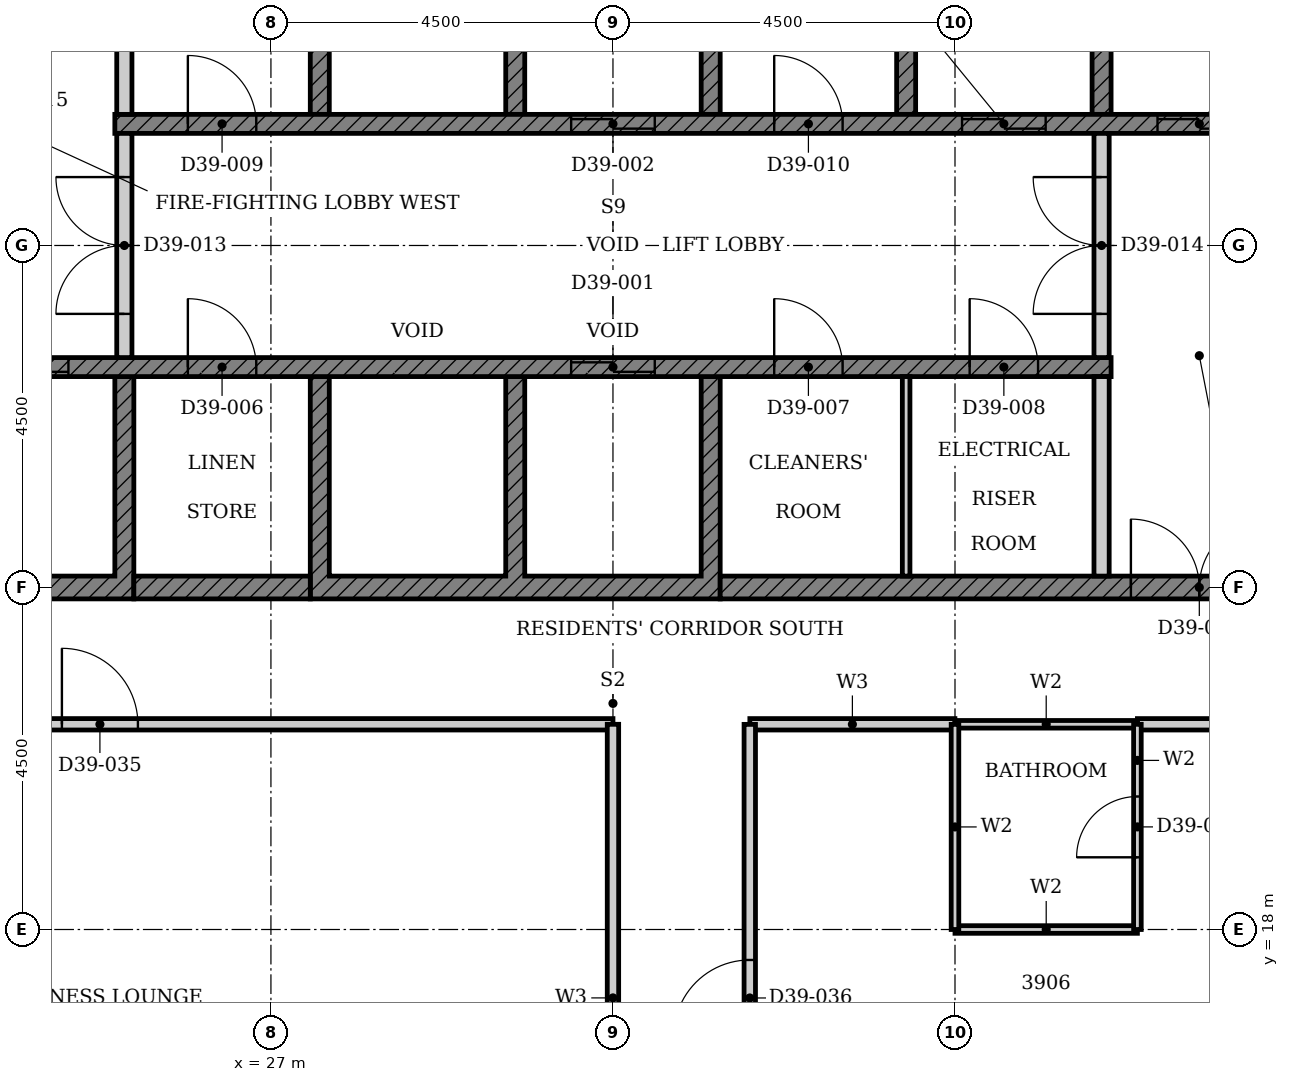
"""IFC4 building model, lengths in metres.
Left out: names, types, materials, properties, quantities, classifications, styles, units other than length and angle.
Written with IfcOpenShell. Run it as: python <this file> out.ifc"""

import sys

from ifc_helpers import new_model, si_unit, direction, frame, frame_2d, origin, place, context, subcontext, project, spatial, polyline, rectangle, outline, extrude, element, fill, save


model = new_model("IFC4")
c1 = context("Model", 3, precision=1e-05, world=origin(), true_north=direction((0.0, 1.0)))
c2 = subcontext(c1, "Body", "Model", "MODEL_VIEW")
j1 = project(units=[si_unit("LENGTHUNIT", "METRE"), si_unit("PLANEANGLEUNIT", "RADIAN")], contexts=[c1])
p1 = place(None, origin())
s1 = spatial("IfcSite", under=j1, at=p1, CompositionType="ELEMENT")
p2 = place(p1, origin())
s2 = spatial("IfcBuilding", under=s1, at=p2, CompositionType="ELEMENT")
p3 = place(p2, frame((0.0, 0.0, 158.0)))
s3 = spatial("IfcBuildingStorey", under=s2, at=p3, CompositionType="ELEMENT", Elevation=158.0)
p4 = place(p3, origin())
e1 = element("IfcWall", 1, at=p4, inside=s3, PredefinedType="SHEAR", context=c2, shape_type="SweptSolid", body=[
    extrude(outline(polyline([(22.375, 22.35), (25.197, 22.35), (25.197, 25.275), (24.947, 25.275), (24.947, 22.65), (22.625, 22.65), (22.625, 25.275), (22.375, 25.275), (22.375, 22.35)])), origin(), (0.0, 0.0, 1.0), 3.4),
])
p5 = place(p3, origin())
e2 = element("IfcWall", 2, at=p5, inside=s3, PredefinedType="SHEAR", context=c2, shape_type="SweptSolid", body=[
    extrude(outline(polyline([(27.518, 22.35), (32.911, 22.35), (32.911, 25.275), (32.661, 25.275), (32.661, 22.65), (30.339, 22.65), (30.339, 25.275), (30.089, 25.275), (30.089, 22.65), (27.768, 22.65), (27.768, 25.275), (27.518, 25.275), (27.518, 22.35)])), origin(), (0.0, 0.0, 1.0), 3.4),
])
p6 = place(p3, origin())
e3 = element("IfcWall", 3, at=p6, inside=s3, PredefinedType="SHEAR", context=c2, shape_type="SweptSolid", body=[
    extrude(outline(polyline([(27.518, 28.725), (27.768, 28.725), (27.768, 31.35), (30.089, 31.35), (30.089, 28.725), (30.339, 28.725), (30.339, 31.35), (32.661, 31.35), (32.661, 28.725), (32.911, 28.725), (32.911, 31.65), (27.518, 31.65), (27.518, 28.725)])), origin(), (0.0, 0.0, 1.0), 3.4),
])
p7 = place(p3, origin())
e4 = element("IfcWall", 4, at=p7, inside=s3, PredefinedType="SHEAR", context=c2, shape_type="SweptSolid", body=[
    extrude(outline(polyline([(35.232, 28.725), (35.482, 28.725), (35.482, 31.35), (37.803, 31.35), (37.803, 28.725), (38.053, 28.725), (38.053, 31.35), (40.375, 31.35), (40.375, 28.725), (40.625, 28.725), (40.625, 31.65), (35.232, 31.65), (35.232, 28.725)])), origin(), (0.0, 0.0, 1.0), 3.4),
])
p8 = place(p3, frame((25.197, 22.5, 0.0), z_axis=(0.0, 0.0, 1.0), x_axis=(1.0, 0.0, 0.0)))
e5 = element("IfcWall", 5, at=p8, inside=s3, PredefinedType="SHEAR", context=c2, shape_type="SweptSolid", body=[
    extrude(rectangle(XDim=2.321, YDim=0.3, at=frame_2d((1.161, 0.0))), origin(), (0.0, 0.0, 1.0), 3.4),
])
p9 = place(p3, frame((32.911, 22.5, 0.0), z_axis=(0.0, 0.0, 1.0), x_axis=(1.0, 0.0, 0.0)))
e6 = element("IfcWall", 6, at=p9, inside=s3, PredefinedType="SHEAR", context=c2, shape_type="SweptSolid", body=[
    extrude(rectangle(XDim=11.939, YDim=0.3, at=frame_2d((5.97, 0.0))), origin(), (0.0, 0.0, 1.0), 3.4),
])
p10 = place(p9, frame((5.404, 0.0, 0.0)))
e7 = element("IfcOpeningElement", 7, at=p10, cuts=e6, PredefinedType="OPENING", context=c2, shape_type="SweptSolid", body=[
    extrude(rectangle(XDim=1.8, YDim=2.1, at=frame_2d((0.9, 1.05))), frame((0.0, 0.16, 0.0), z_axis=(0.0, -1.0, 0.0), x_axis=(1.0, 0.0, 0.0)), (0.0, 0.0, 1.0), 0.32),
])
p11 = place(p3, frame((22.375, 25.4, 0.0), z_axis=(0.0, 0.0, 1.0), x_axis=(1.0, 0.0, 0.0)))
e8 = element("IfcWall", 8, at=p11, inside=s3, PredefinedType="SHEAR", context=c2, shape_type="SweptSolid", body=[
    extrude(rectangle(XDim=15.678, YDim=0.25, at=frame_2d((7.839, 0.0))), origin(), (0.0, 0.0, 1.0), 3.4),
])
p12 = place(p11, frame((8.575, 0.0, 0.0)))
e9 = element("IfcOpeningElement", 9, at=p12, cuts=e8, PredefinedType="OPENING", context=c2, shape_type="SweptSolid", body=[
    extrude(rectangle(XDim=1.1, YDim=2.1, at=frame_2d((0.55, 1.05))), frame((0.0, 0.135, 0.0), z_axis=(0.0, -1.0, 0.0), x_axis=(1.0, 0.0, 0.0)), (0.0, 0.0, 1.0), 0.27),
])
p13 = place(p11, frame((0.861, 0.0, 0.0)))
e10 = element("IfcOpeningElement", 10, at=p13, cuts=e8, PredefinedType="OPENING", context=c2, shape_type="SweptSolid", body=[
    extrude(rectangle(XDim=1.1, YDim=2.1, at=frame_2d((0.55, 1.05))), frame((0.0, 0.135, 0.0), z_axis=(0.0, -1.0, 0.0), x_axis=(1.0, 0.0, 0.0)), (0.0, 0.0, 1.0), 0.27),
])
p14 = place(p11, frame((3.532, 0.0, 0.0)))
e11 = element("IfcOpeningElement", 11, at=p14, cuts=e8, PredefinedType="OPENING", context=c2, shape_type="SweptSolid", body=[
    extrude(rectangle(XDim=0.9, YDim=2.1, at=frame_2d((0.45, 1.05))), frame((0.0, 0.135, 0.0), z_axis=(0.0, -1.0, 0.0), x_axis=(1.0, 0.0, 0.0)), (0.0, 0.0, 1.0), 0.27),
])
p15 = place(p11, frame((11.246, 0.0, 0.0)))
e12 = element("IfcOpeningElement", 12, at=p15, cuts=e8, PredefinedType="OPENING", context=c2, shape_type="SweptSolid", body=[
    extrude(rectangle(XDim=0.9, YDim=2.1, at=frame_2d((0.45, 1.05))), frame((0.0, 0.135, 0.0), z_axis=(0.0, -1.0, 0.0), x_axis=(1.0, 0.0, 0.0)), (0.0, 0.0, 1.0), 0.27),
])
p16 = place(p11, frame((13.818, 0.0, 0.0)))
e13 = element("IfcOpeningElement", 13, at=p16, cuts=e8, PredefinedType="OPENING", context=c2, shape_type="SweptSolid", body=[
    extrude(rectangle(XDim=0.9, YDim=2.1, at=frame_2d((0.45, 1.05))), frame((0.0, 0.135, 0.0), z_axis=(0.0, -1.0, 0.0), x_axis=(1.0, 0.0, 0.0)), (0.0, 0.0, 1.0), 0.27),
])
p17 = place(p3, frame((24.947, 28.6, 0.0), z_axis=(0.0, 0.0, 1.0), x_axis=(1.0, 0.0, 0.0)))
e14 = element("IfcWall", 14, at=p17, inside=s3, PredefinedType="SHEAR", context=c2, shape_type="SweptSolid", body=[
    extrude(rectangle(XDim=15.678, YDim=0.25, at=frame_2d((7.839, 0.0))), origin(), (0.0, 0.0, 1.0), 3.4),
])
p18 = place(p17, frame((6.004, 0.0, 0.0)))
e15 = element("IfcOpeningElement", 15, at=p18, cuts=e14, PredefinedType="OPENING", context=c2, shape_type="SweptSolid", body=[
    extrude(rectangle(XDim=1.1, YDim=2.1, at=frame_2d((0.55, 1.05))), frame((0.0, 0.135, 0.0), z_axis=(0.0, -1.0, 0.0), x_axis=(1.0, 0.0, 0.0)), (0.0, 0.0, 1.0), 0.27),
])
p19 = place(p17, frame((11.146, 0.0, 0.0)))
e16 = element("IfcOpeningElement", 16, at=p19, cuts=e14, PredefinedType="OPENING", context=c2, shape_type="SweptSolid", body=[
    extrude(rectangle(XDim=1.1, YDim=2.1, at=frame_2d((0.55, 1.05))), frame((0.0, 0.135, 0.0), z_axis=(0.0, -1.0, 0.0), x_axis=(1.0, 0.0, 0.0)), (0.0, 0.0, 1.0), 0.27),
])
p20 = place(p17, frame((13.718, 0.0, 0.0)))
e17 = element("IfcOpeningElement", 17, at=p20, cuts=e14, PredefinedType="OPENING", context=c2, shape_type="SweptSolid", body=[
    extrude(rectangle(XDim=1.1, YDim=2.1, at=frame_2d((0.55, 1.05))), frame((0.0, 0.135, 0.0), z_axis=(0.0, -1.0, 0.0), x_axis=(1.0, 0.0, 0.0)), (0.0, 0.0, 1.0), 0.27),
])
p21 = place(p17, frame((0.961, 0.0, 0.0)))
e18 = element("IfcOpeningElement", 18, at=p21, cuts=e14, PredefinedType="OPENING", context=c2, shape_type="SweptSolid", body=[
    extrude(rectangle(XDim=0.9, YDim=2.1, at=frame_2d((0.45, 1.05))), frame((0.0, 0.135, 0.0), z_axis=(0.0, -1.0, 0.0), x_axis=(1.0, 0.0, 0.0)), (0.0, 0.0, 1.0), 0.27),
])
p22 = place(p17, frame((8.675, 0.0, 0.0)))
e19 = element("IfcOpeningElement", 19, at=p22, cuts=e14, PredefinedType="OPENING", context=c2, shape_type="SweptSolid", body=[
    extrude(rectangle(XDim=0.9, YDim=2.1, at=frame_2d((0.45, 1.05))), frame((0.0, 0.135, 0.0), z_axis=(0.0, -1.0, 0.0), x_axis=(1.0, 0.0, 0.0)), (0.0, 0.0, 1.0), 0.27),
])
p23 = place(p3, frame((37.928, 22.65, 0.0), z_axis=(0.0, 0.0, 1.0), x_axis=(0.0, 1.0, 0.0)))
e20 = element("IfcWall", 20, at=p23, inside=s3, PredefinedType="PARTITIONING", context=c2, shape_type="SweptSolid", body=[
    extrude(rectangle(XDim=2.625, YDim=0.2, at=frame_2d((1.312, 0.0))), origin(), (0.0, 0.0, 1.0), 3.4),
])
p24 = place(p3, frame((35.357, 22.65, 0.0), z_axis=(0.0, 0.0, 1.0), x_axis=(0.0, 1.0, 0.0)))
e21 = element("IfcWall", 21, at=p24, inside=s3, PredefinedType="PARTITIONING", context=c2, shape_type="SweptSolid", body=[
    extrude(rectangle(XDim=2.625, YDim=0.1, at=frame_2d((1.312, 0.0))), origin(), (0.0, 0.0, 1.0), 3.4),
])
p25 = place(p3, frame((25.072, 28.725, 0.0), z_axis=(0.0, 0.0, 1.0), x_axis=(0.0, 1.0, 0.0)))
e22 = element("IfcWall", 22, at=p25, inside=s3, PredefinedType="PARTITIONING", context=c2, shape_type="SweptSolid", body=[
    extrude(rectangle(XDim=2.625, YDim=0.2, at=frame_2d((1.312, 0.0))), origin(), (0.0, 0.0, 1.0), 3.4),
])
p26 = place(p3, frame((25.072, 25.525, 0.0), z_axis=(0.0, 0.0, 1.0), x_axis=(0.0, 1.0, 0.0)))
e23 = element("IfcWall", 23, at=p26, inside=s3, PredefinedType="PARTITIONING", context=c2, shape_type="SweptSolid", body=[
    extrude(rectangle(XDim=2.95, YDim=0.2, at=frame_2d((1.475, 0.0))), origin(), (0.0, 0.0, 1.0), 3.4),
])
p27 = place(p26, frame((0.575, 0.0, 0.0)))
e24 = element("IfcOpeningElement", 24, at=p27, cuts=e23, PredefinedType="OPENING", context=c2, shape_type="SweptSolid", body=[
    extrude(rectangle(XDim=1.8, YDim=2.1, at=frame_2d((0.9, 1.05))), frame((0.0, 0.11, 0.0), z_axis=(0.0, -1.0, 0.0), x_axis=(1.0, 0.0, 0.0)), (0.0, 0.0, 1.0), 0.22),
])
p28 = place(p3, frame((37.928, 25.525, 0.0), z_axis=(0.0, 0.0, 1.0), x_axis=(0.0, 1.0, 0.0)))
e25 = element("IfcWall", 25, at=p28, inside=s3, PredefinedType="PARTITIONING", context=c2, shape_type="SweptSolid", body=[
    extrude(rectangle(XDim=2.95, YDim=0.2, at=frame_2d((1.475, 0.0))), origin(), (0.0, 0.0, 1.0), 3.4),
])
p29 = place(p28, frame((0.575, 0.0, 0.0)))
e26 = element("IfcOpeningElement", 26, at=p29, cuts=e25, PredefinedType="OPENING", context=c2, shape_type="SweptSolid", body=[
    extrude(rectangle(XDim=1.8, YDim=2.1, at=frame_2d((0.9, 1.05))), frame((0.0, 0.11, 0.0), z_axis=(0.0, -1.0, 0.0), x_axis=(1.0, 0.0, 0.0)), (0.0, 0.0, 1.0), 0.22),
])
p30 = place(p3, frame((33.301, 20.7, 0.0), z_axis=(0.0, 0.0, 1.0), x_axis=(1.0, 0.0, 0.0)))
e27 = element("IfcWall", 27, at=p30, inside=s3, PredefinedType="PARTITIONING", context=c2, shape_type="SweptSolid", body=[
    extrude(rectangle(XDim=2.698, YDim=0.15, at=frame_2d((1.349, 0.0))), origin(), (0.0, 0.0, 1.0), 3.4),
])
p31 = place(p3, frame((38.4, 20.7, 0.0), z_axis=(0.0, 0.0, 1.0), x_axis=(1.0, 0.0, 0.0)))
e28 = element("IfcWall", 28, at=p31, inside=s3, PredefinedType="PARTITIONING", context=c2, shape_type="SweptSolid", body=[
    extrude(rectangle(XDim=8.4, YDim=0.15, at=frame_2d((4.2, 0.0))), origin(), (0.0, 0.0, 1.0), 3.4),
])
p32 = place(p3, frame((18.0, 20.7, 0.0), z_axis=(0.0, 0.0, 1.0), x_axis=(1.0, 0.0, 0.0)))
e29 = element("IfcWall", 29, at=p32, inside=s3, PredefinedType="PARTITIONING", context=c2, shape_type="SweptSolid", body=[
    extrude(rectangle(XDim=13.5, YDim=0.15, at=frame_2d((6.75, 0.0))), origin(), (0.0, 0.0, 1.0), 3.4),
])
p33 = place(p32, frame((6.25, 0.0, 0.0)))
e30 = element("IfcOpeningElement", 30, at=p33, cuts=e29, PredefinedType="OPENING", context=c2, shape_type="SweptSolid", body=[
    extrude(rectangle(XDim=1.0, YDim=2.1, at=frame_2d((0.5, 1.05))), frame((0.0, 0.085, 0.0), z_axis=(0.0, -1.0, 0.0), x_axis=(1.0, 0.0, 0.0)), (0.0, 0.0, 1.0), 0.17),
])
p34 = place(p3, frame((31.5, 13.5, 0.0), z_axis=(0.0, 0.0, 1.0), x_axis=(0.0, 1.0, 0.0)))
e31 = element("IfcWall", 31, at=p34, inside=s3, PredefinedType="PARTITIONING", context=c2, shape_type="SweptSolid", body=[
    extrude(rectangle(XDim=7.2, YDim=0.15, at=frame_2d((3.6, 0.0))), origin(), (0.0, 0.0, 1.0), 3.4),
])
p35 = place(p3, frame((33.3, 6.9, 0.0), z_axis=(0.0, 0.0, 1.0), x_axis=(0.0, 1.0, 0.0)))
e32 = element("IfcWall", 32, at=p35, inside=s3, PredefinedType="PARTITIONING", context=c2, shape_type="SweptSolid", body=[
    extrude(rectangle(XDim=13.799, YDim=0.15, at=frame_2d((6.899, 0.0))), origin(), (0.0, 0.0, 1.0), 3.4),
])
p36 = place(p35, frame((9.699, 0.0, 0.0)))
e33 = element("IfcOpeningElement", 33, at=p36, cuts=e32, PredefinedType="OPENING", context=c2, shape_type="SweptSolid", body=[
    extrude(rectangle(XDim=1.0, YDim=2.2, at=frame_2d((0.5, 1.1))), frame((0.0, 0.085, 0.0), z_axis=(0.0, -1.0, 0.0), x_axis=(1.0, 0.0, 0.0)), (0.0, 0.0, 1.0), 0.17),
])
p37 = place(p35, frame((1.3, 0.0, 0.0)))
e34 = element("IfcOpeningElement", 34, at=p37, cuts=e32, PredefinedType="OPENING", context=c2, shape_type="SweptSolid", body=[
    extrude(rectangle(XDim=1.0, YDim=2.2, at=frame_2d((0.5, 1.1))), frame((0.0, 0.085, 0.0), z_axis=(0.0, -1.0, 0.0), x_axis=(1.0, 0.0, 0.0)), (0.0, 0.0, 1.0), 0.17),
])
for number, where, z_axis, x_axis in (
    (35, (36.0, 18.0, 0.0), (0.0, 0.0, 1.0), (1.0, 0.0, 0.0)),
    (36, (36.0, 20.7, 0.0), (0.0, 0.0, 1.0), (1.0, 0.0, 0.0)),
):
    element("IfcWall", number, at=place(p3, frame(where, z_axis=z_axis, x_axis=x_axis)), inside=s3, PredefinedType="PARTITIONING", context=c2, shape_type="SweptSolid", body=[
        extrude(rectangle(XDim=2.4, YDim=0.1, at=frame_2d((1.2, 0.0))), origin(), (0.0, 0.0, 1.0), 3.4),
    ])
p38 = place(p3, frame((36.0, 18.0, 0.0), z_axis=(0.0, 0.0, 1.0), x_axis=(0.0, 1.0, 0.0)))
e37 = element("IfcWall", 37, at=p38, inside=s3, PredefinedType="PARTITIONING", context=c2, shape_type="SweptSolid", body=[
    extrude(rectangle(XDim=2.699, YDim=0.1, at=frame_2d((1.35, 0.0))), origin(), (0.0, 0.0, 1.0), 3.4),
])
p39 = place(p3, frame((38.4, 18.0, 0.0), z_axis=(0.0, 0.0, 1.0), x_axis=(0.0, 1.0, 0.0)))
e38 = element("IfcWall", 38, at=p39, inside=s3, PredefinedType="PARTITIONING", context=c2, shape_type="SweptSolid", body=[
    extrude(rectangle(XDim=2.7, YDim=0.1, at=frame_2d((1.35, 0.0))), origin(), (0.0, 0.0, 1.0), 3.4),
])
p40 = place(p39, frame((0.95, 0.0, 0.0)))
e39 = element("IfcOpeningElement", 39, at=p40, cuts=e38, PredefinedType="OPENING", context=c2, shape_type="SweptSolid", body=[
    extrude(rectangle(XDim=0.8, YDim=2.1, at=frame_2d((0.4, 1.05))), frame((0.0, 0.06, 0.0), z_axis=(0.0, -1.0, 0.0), x_axis=(1.0, 0.0, 0.0)), (0.0, 0.0, 1.0), 0.12),
])
p41 = place(p12, origin())
e40 = element("IfcDoor", 40, at=p41, inside=s3, OperationType="DOUBLE_DOOR_SLIDING", PredefinedType="DOOR", context=c2, shape_type="SweptSolid", body=[
    extrude(rectangle(XDim=1.1, YDim=2.1, at=frame_2d((0.55, 1.05))), frame((0.0, 0.025, 0.0), z_axis=(0.0, -1.0, 0.0), x_axis=(1.0, 0.0, 0.0)), (0.0, 0.0, 1.0), 0.05),
])
fill(e9, e40)
p42 = place(p18, origin())
e41 = element("IfcDoor", 41, at=p42, inside=s3, OperationType="DOUBLE_DOOR_SLIDING", PredefinedType="DOOR", context=c2, shape_type="SweptSolid", body=[
    extrude(rectangle(XDim=1.1, YDim=2.1, at=frame_2d((0.55, 1.05))), frame((0.0, 0.025, 0.0), z_axis=(0.0, -1.0, 0.0), x_axis=(1.0, 0.0, 0.0)), (0.0, 0.0, 1.0), 0.05),
])
fill(e15, e41)
p43 = place(p19, origin())
e42 = element("IfcDoor", 42, at=p43, inside=s3, OperationType="DOUBLE_DOOR_SLIDING", PredefinedType="DOOR", context=c2, shape_type="SweptSolid", body=[
    extrude(rectangle(XDim=1.1, YDim=2.1, at=frame_2d((0.55, 1.05))), frame((0.0, 0.025, 0.0), z_axis=(0.0, -1.0, 0.0), x_axis=(1.0, 0.0, 0.0)), (0.0, 0.0, 1.0), 0.05),
])
fill(e16, e42)
p44 = place(p13, origin())
e43 = element("IfcDoor", 43, at=p44, inside=s3, OperationType="DOUBLE_DOOR_SLIDING", PredefinedType="DOOR", context=c2, shape_type="SweptSolid", body=[
    extrude(rectangle(XDim=1.1, YDim=2.1, at=frame_2d((0.55, 1.05))), frame((0.0, 0.025, 0.0), z_axis=(0.0, -1.0, 0.0), x_axis=(1.0, 0.0, 0.0)), (0.0, 0.0, 1.0), 0.05),
])
fill(e10, e43)
p45 = place(p20, origin())
e44 = element("IfcDoor", 44, at=p45, inside=s3, OperationType="DOUBLE_DOOR_SLIDING", PredefinedType="DOOR", context=c2, shape_type="SweptSolid", body=[
    extrude(rectangle(XDim=1.1, YDim=2.1, at=frame_2d((0.55, 1.05))), frame((0.0, 0.025, 0.0), z_axis=(0.0, -1.0, 0.0), x_axis=(1.0, 0.0, 0.0)), (0.0, 0.0, 1.0), 0.05),
])
fill(e17, e44)
p46 = place(p14, origin())
e45 = element("IfcDoor", 45, at=p46, inside=s3, OperationType="SINGLE_SWING_LEFT", PredefinedType="DOOR", context=c2, shape_type="SweptSolid", body=[
    extrude(rectangle(XDim=0.9, YDim=2.1, at=frame_2d((0.45, 1.05))), frame((0.0, 0.025, 0.0), z_axis=(0.0, -1.0, 0.0), x_axis=(1.0, 0.0, 0.0)), (0.0, 0.0, 1.0), 0.05),
])
fill(e11, e45)
p47 = place(p15, origin())
e46 = element("IfcDoor", 46, at=p47, inside=s3, OperationType="SINGLE_SWING_LEFT", PredefinedType="DOOR", context=c2, shape_type="SweptSolid", body=[
    extrude(rectangle(XDim=0.9, YDim=2.1, at=frame_2d((0.45, 1.05))), frame((0.0, 0.025, 0.0), z_axis=(0.0, -1.0, 0.0), x_axis=(1.0, 0.0, 0.0)), (0.0, 0.0, 1.0), 0.05),
])
fill(e12, e46)
p48 = place(p16, origin())
e47 = element("IfcDoor", 47, at=p48, inside=s3, OperationType="SINGLE_SWING_LEFT", PredefinedType="DOOR", context=c2, shape_type="SweptSolid", body=[
    extrude(rectangle(XDim=0.9, YDim=2.1, at=frame_2d((0.45, 1.05))), frame((0.0, 0.025, 0.0), z_axis=(0.0, -1.0, 0.0), x_axis=(1.0, 0.0, 0.0)), (0.0, 0.0, 1.0), 0.05),
])
fill(e13, e47)
p49 = place(p21, origin())
e48 = element("IfcDoor", 48, at=p49, inside=s3, OperationType="SINGLE_SWING_LEFT", PredefinedType="DOOR", context=c2, shape_type="SweptSolid", body=[
    extrude(rectangle(XDim=0.9, YDim=2.1, at=frame_2d((0.45, 1.05))), frame((0.0, 0.025, 0.0), z_axis=(0.0, -1.0, 0.0), x_axis=(1.0, 0.0, 0.0)), (0.0, 0.0, 1.0), 0.05),
])
fill(e18, e48)
p50 = place(p22, origin())
e49 = element("IfcDoor", 49, at=p50, inside=s3, OperationType="SINGLE_SWING_LEFT", PredefinedType="DOOR", context=c2, shape_type="SweptSolid", body=[
    extrude(rectangle(XDim=0.9, YDim=2.1, at=frame_2d((0.45, 1.05))), frame((0.0, 0.025, 0.0), z_axis=(0.0, -1.0, 0.0), x_axis=(1.0, 0.0, 0.0)), (0.0, 0.0, 1.0), 0.05),
])
fill(e19, e49)
p51 = place(p27, origin())
e50 = element("IfcDoor", 50, at=p51, inside=s3, OperationType="DOUBLE_DOOR_SINGLE_SWING", PredefinedType="DOOR", context=c2, shape_type="SweptSolid", body=[
    extrude(rectangle(XDim=1.8, YDim=2.1, at=frame_2d((0.9, 1.05))), frame((0.0, 0.025, 0.0), z_axis=(0.0, -1.0, 0.0), x_axis=(1.0, 0.0, 0.0)), (0.0, 0.0, 1.0), 0.05),
])
fill(e24, e50)
p52 = place(p29, origin())
e51 = element("IfcDoor", 51, at=p52, inside=s3, OperationType="DOUBLE_DOOR_SINGLE_SWING", PredefinedType="DOOR", context=c2, shape_type="SweptSolid", body=[
    extrude(rectangle(XDim=1.8, YDim=2.1, at=frame_2d((0.9, 1.05))), frame((0.0, 0.025, 0.0), z_axis=(0.0, -1.0, 0.0), x_axis=(1.0, 0.0, 0.0)), (0.0, 0.0, 1.0), 0.05),
])
fill(e26, e51)
p53 = place(p10, origin())
e52 = element("IfcDoor", 52, at=p53, inside=s3, OperationType="DOUBLE_DOOR_SINGLE_SWING", PredefinedType="DOOR", context=c2, shape_type="SweptSolid", body=[
    extrude(rectangle(XDim=1.8, YDim=2.1, at=frame_2d((0.9, 1.05))), frame((0.0, 0.025, 0.0), z_axis=(0.0, -1.0, 0.0), x_axis=(1.0, 0.0, 0.0)), (0.0, 0.0, 1.0), 0.05),
])
fill(e7, e52)
p54 = place(p33, origin())
e53 = element("IfcDoor", 53, at=p54, inside=s3, OperationType="SINGLE_SWING_RIGHT", PredefinedType="DOOR", context=c2, shape_type="SweptSolid", body=[
    extrude(rectangle(XDim=1.0, YDim=2.1, at=frame_2d((0.5, 1.05))), frame((0.0, 0.025, 0.0), z_axis=(0.0, -1.0, 0.0), x_axis=(1.0, 0.0, 0.0)), (0.0, 0.0, 1.0), 0.05),
])
fill(e30, e53)
p55 = place(p36, origin())
e54 = element("IfcDoor", 54, at=p55, inside=s3, OperationType="SINGLE_SWING_RIGHT", PredefinedType="DOOR", context=c2, shape_type="SweptSolid", body=[
    extrude(rectangle(XDim=1.0, YDim=2.2, at=frame_2d((0.5, 1.1))), frame((0.0, 0.025, 0.0), z_axis=(0.0, -1.0, 0.0), x_axis=(1.0, 0.0, 0.0)), (0.0, 0.0, 1.0), 0.05),
])
fill(e33, e54)
p56 = place(p40, origin())
e55 = element("IfcDoor", 55, at=p56, inside=s3, OperationType="SINGLE_SWING_RIGHT", PredefinedType="DOOR", context=c2, shape_type="SweptSolid", body=[
    extrude(rectangle(XDim=0.8, YDim=2.1, at=frame_2d((0.4, 1.05))), frame((0.0, 0.025, 0.0), z_axis=(0.0, -1.0, 0.0), x_axis=(1.0, 0.0, 0.0)), (0.0, 0.0, 1.0), 0.05),
])
fill(e39, e55)
save(model, sys.argv[1])
